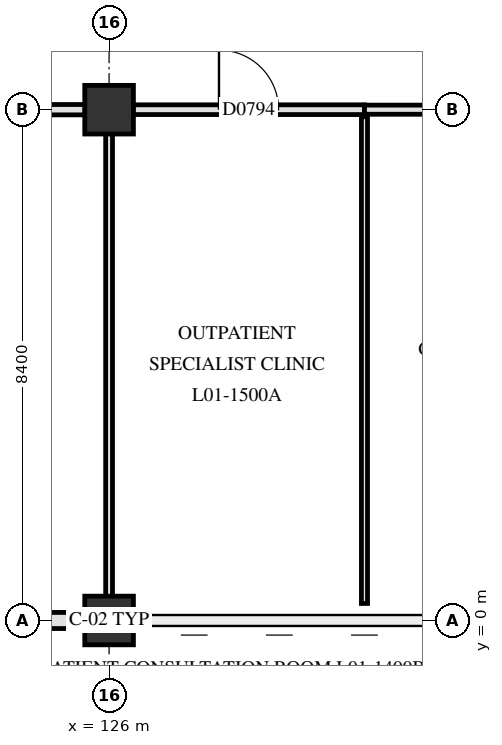
"""IFC4 building model, lengths in metres.
Left out: names, types, materials, properties, quantities, classifications, styles, units other than length and angle.
Written with IfcOpenShell. Run it as: python <this file> out.ifc"""

import sys

from ifc_helpers import new_model, si_unit, direction, frame, frame_2d, origin, origin_2d, place, context, subcontext, project, spatial, rectangle, extrude, element, fill, save


model = new_model("IFC4")
c1 = context("Model", 3, precision=1e-05, world=origin(), true_north=direction((0.0, 1.0)))
c2 = subcontext(c1, "Body", "Model", "MODEL_VIEW")
j1 = project(units=[si_unit("LENGTHUNIT", "METRE"), si_unit("PLANEANGLEUNIT", "RADIAN")], contexts=[c1])
p1 = place(None, origin())
s1 = spatial("IfcSite", under=j1, at=p1, CompositionType="ELEMENT")
p2 = place(p1, origin())
s2 = spatial("IfcBuilding", under=s1, at=p2, CompositionType="ELEMENT")
p3 = place(p2, frame((0.0, 0.0, 4.8)))
s3 = spatial("IfcBuildingStorey", under=s2, at=p3, CompositionType="ELEMENT", Elevation=4.8)
for number, where, z_axis, x_axis in (
    (1, (126.0, 0.0, 0.0), (0.0, 0.0, 1.0), (1.0, 0.0, 0.0)),
    (2, (126.0, 8.4, 0.0), (0.0, 0.0, 1.0), (1.0, 0.0, 0.0)),
):
    element("IfcColumn", number, at=place(p3, frame(where, z_axis=z_axis, x_axis=x_axis)), inside=s3, PredefinedType="COLUMN", context=c2, shape_type="SweptSolid", body=[
        extrude(rectangle(XDim=0.8, YDim=0.8, at=origin_2d()), origin(), (0.0, 0.0, 1.0), 4.5),
    ])
p4 = place(p3, frame((125.525, 0.0, 0.0), z_axis=(0.0, 0.0, 1.0), x_axis=(-1.0, 0.0, 0.0)))
e3 = element("IfcWall", 3, at=p4, inside=s3, PredefinedType="SOLIDWALL", context=c2, shape_type="SweptSolid", body=[
    extrude(rectangle(XDim=7.45, YDim=0.265, at=frame_2d((3.725, 0.0))), origin(), (0.0, 0.0, 1.0), 3.44),
])
p5 = place(p4, frame((0.863, 0.0, 0.85)))
e4 = element("IfcOpeningElement", 4, at=p5, cuts=e3, PredefinedType="OPENING", context=c2, shape_type="SweptSolid", body=[
    extrude(rectangle(XDim=2.0, YDim=1.66, at=frame_2d((1.0, 0.83))), frame((0.0, 0.142, 0.0), z_axis=(0.0, -1.0, 0.0), x_axis=(1.0, 0.0, 0.0)), (0.0, 0.0, 1.0), 0.285),
])
p6 = place(p4, frame((5.012, 0.0, 0.85)))
e5 = element("IfcOpeningElement", 5, at=p6, cuts=e3, PredefinedType="OPENING", context=c2, shape_type="SweptSolid", body=[
    extrude(rectangle(XDim=1.15, YDim=1.78, at=frame_2d((0.575, 0.89))), frame((0.0, 0.142, 0.0), z_axis=(0.0, -1.0, 0.0), x_axis=(1.0, 0.0, 0.0)), (0.0, 0.0, 1.0), 0.285),
])
p7 = place(p3, frame((121.8, 8.4, 0.0), z_axis=(0.0, 0.0, 1.0), x_axis=(1.0, 0.0, 0.0)))
e6 = element("IfcWall", 6, at=p7, inside=s3, PredefinedType="PARTITIONING", context=c2, shape_type="SweptSolid", body=[
    extrude(rectangle(XDim=3.805, YDim=0.17, at=frame_2d((1.902, 0.0))), origin(), (0.0, 0.0, 1.0), 3.54),
])
p8 = place(p7, frame((1.353, 0.0, 0.0)))
e7 = element("IfcOpeningElement", 7, at=p8, cuts=e6, PredefinedType="OPENING", context=c2, shape_type="SweptSolid", body=[
    extrude(rectangle(XDim=1.1, YDim=2.15, at=frame_2d((0.55, 1.075))), frame((0.0, 0.095, 0.0), z_axis=(0.0, -1.0, 0.0), x_axis=(1.0, 0.0, 0.0)), (0.0, 0.0, 1.0), 0.19),
])
p9 = place(p3, frame((126.395, 8.4, 0.0), z_axis=(0.0, 0.0, 1.0), x_axis=(1.0, 0.0, 0.0)))
e8 = element("IfcWall", 8, at=p9, inside=s3, PredefinedType="PARTITIONING", context=c2, shape_type="SweptSolid", body=[
    extrude(rectangle(XDim=3.805, YDim=0.16, at=frame_2d((1.902, 0.0))), origin(), (0.0, 0.0, 1.0), 3.54),
])
p10 = place(p9, frame((1.413, 0.0, 0.0)))
e9 = element("IfcOpeningElement", 9, at=p10, cuts=e8, PredefinedType="OPENING", context=c2, shape_type="SweptSolid", body=[
    extrude(rectangle(XDim=0.98, YDim=2.12, at=frame_2d((0.49, 1.06))), frame((0.0, 0.09, 0.0), z_axis=(0.0, -1.0, 0.0), x_axis=(1.0, 0.0, 0.0)), (0.0, 0.0, 1.0), 0.18),
])
p11 = place(p3, frame((130.2, 8.4, 0.0), z_axis=(0.0, 0.0, 1.0), x_axis=(1.0, 0.0, 0.0)))
e10 = element("IfcWall", 10, at=p11, inside=s3, PredefinedType="PARTITIONING", context=c2, shape_type="SweptSolid", body=[
    extrude(rectangle(XDim=3.805, YDim=0.15, at=frame_2d((1.902, 0.0))), origin(), (0.0, 0.0, 1.0), 3.54),
])
p12 = place(p11, frame((1.343, 0.0, 0.0)))
e11 = element("IfcOpeningElement", 11, at=p12, cuts=e10, PredefinedType="OPENING", context=c2, shape_type="SweptSolid", body=[
    extrude(rectangle(XDim=1.12, YDim=2.18, at=frame_2d((0.56, 1.09))), frame((0.0, 0.085, 0.0), z_axis=(0.0, -1.0, 0.0), x_axis=(1.0, 0.0, 0.0)), (0.0, 0.0, 1.0), 0.17),
])
p13 = place(p3, frame((126.0, 0.395, 0.0), z_axis=(0.0, 0.0, 1.0), x_axis=(0.0, 1.0, 0.0)))
e12 = element("IfcWall", 12, at=p13, inside=s3, PredefinedType="PARTITIONING", context=c2, shape_type="SweptSolid", body=[
    extrude(rectangle(XDim=7.61, YDim=0.112, at=frame_2d((3.805, 0.0))), origin(), (0.0, 0.0, 1.0), 3.59),
])
p14 = place(p3, frame((130.2, 0.28, 0.0), z_axis=(0.0, 0.0, 1.0), x_axis=(0.0, 1.0, 0.0)))
e13 = element("IfcWall", 13, at=p14, inside=s3, PredefinedType="PARTITIONING", context=c2, shape_type="SweptSolid", body=[
    extrude(rectangle(XDim=8.005, YDim=0.1, at=frame_2d((4.002, 0.0))), origin(), (0.0, 0.0, 1.0), 3.54),
])
p15 = place(p10, origin())
e14 = element("IfcDoor", 14, at=p15, inside=s3, OperationType="SINGLE_SWING_LEFT", PredefinedType="DOOR", context=c2, shape_type="SweptSolid", body=[
    extrude(rectangle(XDim=0.98, YDim=2.12, at=frame_2d((0.49, 1.06))), frame((0.0, 0.025, 0.0), z_axis=(0.0, -1.0, 0.0), x_axis=(1.0, 0.0, 0.0)), (0.0, 0.0, 1.0), 0.05),
])
fill(e9, e14)
save(model, sys.argv[1])
